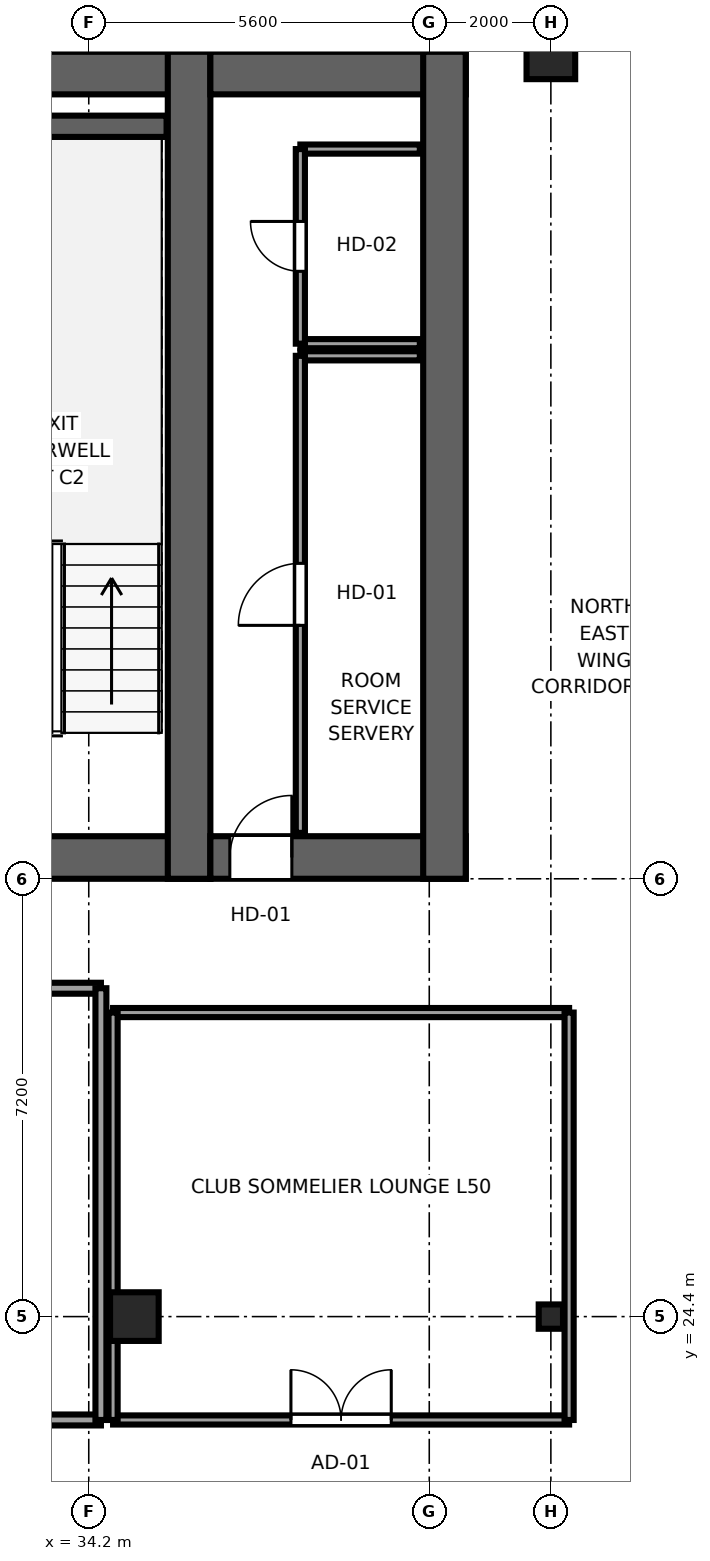
"""IFC4 building model, lengths in metres.
Left out: names, types, materials, properties, quantities, classifications, styles, units other than length and angle.
Written with IfcOpenShell. Run it as: python <this file> out.ifc"""

import sys

from ifc_helpers import new_model, si_unit, direction, frame, frame_2d, origin, origin_2d, place, context, subcontext, project, spatial, rectangle, i_section, extrude, source, transform, mapped, element, fill, save


model = new_model("IFC4")
c1 = context("Model", 3, precision=1e-05, world=origin(), true_north=direction((0.0, 1.0)))
c2 = subcontext(c1, "Body", "Model", "MODEL_VIEW")
j1 = project(units=[si_unit("LENGTHUNIT", "METRE"), si_unit("PLANEANGLEUNIT", "RADIAN")], contexts=[c1])
p1 = place(None, origin())
s1 = spatial("IfcSite", under=j1, at=p1, CompositionType="ELEMENT")
p2 = place(p1, origin())
s2 = spatial("IfcBuilding", under=s1, at=p2, CompositionType="ELEMENT")
p3 = place(p2, frame((0.0, 0.0, 191.1)))
s3 = spatial("IfcBuildingStorey", under=s2, at=p3, CompositionType="ELEMENT", Elevation=191.1)
p4 = place(p3, frame((9.8, 31.95, 0.0), z_axis=(0.0, 0.0, 1.0), x_axis=(1.0, 0.0, 0.0)))
e1 = element("IfcWall", 1, at=p4, inside=s3, PredefinedType="SHEAR", context=c2, shape_type="SweptSolid", body=[
    extrude(rectangle(XDim=26.4, YDim=0.7, at=frame_2d((13.2, 0.0))), origin(), (0.0, 0.0, 1.0), 3.55),
])
p5 = place(p4, frame((6.32, 0.0, 0.0), z_axis=(0.0, 0.0, 1.0), x_axis=(-1.0, 0.0, 0.0)))
e2 = element("IfcOpeningElement", 2, at=p5, cuts=e1, PredefinedType="OPENING", context=c2, shape_type="SweptSolid", body=[
    extrude(rectangle(XDim=1.5, YDim=2.04, at=frame_2d((0.75, 1.02))), frame((0.0, 0.36, 0.0), z_axis=(0.0, -1.0, 0.0), x_axis=(1.0, 0.0, 0.0)), (0.0, 0.0, 1.0), 0.72),
])
p6 = place(p4, frame((13.95, 0.0, 0.0), z_axis=(0.0, 0.0, 1.0), x_axis=(-1.0, 0.0, 0.0)))
e3 = element("IfcOpeningElement", 3, at=p6, cuts=e1, PredefinedType="OPENING", context=c2, shape_type="SweptSolid", body=[
    extrude(rectangle(XDim=1.5, YDim=2.04, at=frame_2d((0.75, 1.02))), frame((0.0, 0.36, 0.0), z_axis=(0.0, -1.0, 0.0), x_axis=(1.0, 0.0, 0.0)), (0.0, 0.0, 1.0), 0.72),
])
p7 = place(p4, frame((21.58, 0.0, 0.0), z_axis=(0.0, 0.0, 1.0), x_axis=(-1.0, 0.0, 0.0)))
e4 = element("IfcOpeningElement", 4, at=p7, cuts=e1, PredefinedType="OPENING", context=c2, shape_type="SweptSolid", body=[
    extrude(rectangle(XDim=1.5, YDim=2.04, at=frame_2d((0.75, 1.02))), frame((0.0, 0.36, 0.0), z_axis=(0.0, -1.0, 0.0), x_axis=(1.0, 0.0, 0.0)), (0.0, 0.0, 1.0), 0.72),
])
p8 = place(p4, frame((8.37, 0.0, 0.0), z_axis=(0.0, 0.0, 1.0), x_axis=(-1.0, 0.0, 0.0)))
e5 = element("IfcOpeningElement", 5, at=p8, cuts=e1, PredefinedType="OPENING", context=c2, shape_type="SweptSolid", body=[
    extrude(rectangle(XDim=0.82, YDim=2.01, at=frame_2d((0.41, 1.005))), frame((0.0, 0.36, 0.0), z_axis=(0.0, -1.0, 0.0), x_axis=(1.0, 0.0, 0.0)), (0.0, 0.0, 1.0), 0.72),
])
p9 = place(p4, frame((18.87, 0.0, 0.0), z_axis=(0.0, 0.0, 1.0), x_axis=(-1.0, 0.0, 0.0)))
e6 = element("IfcOpeningElement", 6, at=p9, cuts=e1, PredefinedType="OPENING", context=c2, shape_type="SweptSolid", body=[
    extrude(rectangle(XDim=0.82, YDim=2.01, at=frame_2d((0.41, 1.005))), frame((0.0, 0.36, 0.0), z_axis=(0.0, -1.0, 0.0), x_axis=(1.0, 0.0, 0.0)), (0.0, 0.0, 1.0), 0.72),
])
p10 = place(p3, frame((9.8, 44.85, 0.0), z_axis=(0.0, 0.0, 1.0), x_axis=(1.0, 0.0, 0.0)))
e7 = element("IfcWall", 7, at=p10, inside=s3, PredefinedType="SHEAR", context=c2, shape_type="SweptSolid", body=[
    extrude(rectangle(XDim=26.4, YDim=0.7, at=frame_2d((13.2, 0.0))), origin(), (0.0, 0.0, 1.0), 3.55),
])
p11 = place(p3, frame((35.85, 31.6, 0.0), z_axis=(0.0, 0.0, 1.0), x_axis=(0.0, 1.0, 0.0)))
e8 = element("IfcWall", 8, at=p11, inside=s3, PredefinedType="SHEAR", context=c2, shape_type="SweptSolid", body=[
    extrude(rectangle(XDim=13.6, YDim=0.7, at=frame_2d((6.8, 0.0))), origin(), (0.0, 0.0, 1.0), 3.55),
])
p12 = place(p3, frame((36.2, 31.95, 0.0), z_axis=(0.0, 0.0, 1.0), x_axis=(1.0, 0.0, 0.0)))
e9 = element("IfcWall", 9, at=p12, inside=s3, PredefinedType="SHEAR", context=c2, shape_type="SweptSolid", body=[
    extrude(rectangle(XDim=4.2, YDim=0.7, at=frame_2d((2.1, 0.0))), origin(), (0.0, 0.0, 1.0), 3.55),
])
p13 = place(p12, frame((1.34, 0.0, 0.0), z_axis=(0.0, 0.0, 1.0), x_axis=(-1.0, 0.0, 0.0)))
e10 = element("IfcOpeningElement", 10, at=p13, cuts=e9, PredefinedType="OPENING", context=c2, shape_type="SweptSolid", body=[
    extrude(rectangle(XDim=1.02, YDim=2.03, at=frame_2d((0.51, 1.015))), frame((0.0, 0.36, 0.0), z_axis=(0.0, -1.0, 0.0), x_axis=(1.0, 0.0, 0.0)), (0.0, 0.0, 1.0), 0.72),
])
p14 = place(p3, frame((36.2, 44.85, 0.0), z_axis=(0.0, 0.0, 1.0), x_axis=(1.0, 0.0, 0.0)))
e11 = element("IfcWall", 11, at=p14, inside=s3, PredefinedType="SHEAR", context=c2, shape_type="SweptSolid", body=[
    extrude(rectangle(XDim=4.2, YDim=0.7, at=frame_2d((2.1, 0.0))), origin(), (0.0, 0.0, 1.0), 3.55),
])
p15 = place(p3, frame((40.05, 31.6, 0.0), z_axis=(0.0, 0.0, 1.0), x_axis=(0.0, 1.0, 0.0)))
e12 = element("IfcWall", 12, at=p15, inside=s3, PredefinedType="SHEAR", context=c2, shape_type="SweptSolid", body=[
    extrude(rectangle(XDim=13.6, YDim=0.7, at=frame_2d((6.8, 0.0))), origin(), (0.0, 0.0, 1.0), 3.55),
])
p16 = place(p3, frame((31.88, 43.975, 0.0), z_axis=(0.0, 0.0, 1.0), x_axis=(1.0, 0.0, 0.0)))
e13 = element("IfcWall", 13, at=p16, inside=s3, PredefinedType="SHEAR", context=c2, shape_type="SweptSolid", body=[
    extrude(rectangle(XDim=3.6, YDim=0.35, at=frame_2d((1.8, 0.0))), origin(), (0.0, 0.0, 1.0), 3.55),
])
m1 = source(origin(), c2, "Body", "SweptSolid", [
    extrude(rectangle(XDim=0.8, YDim=0.8, at=origin_2d()), origin(), (0.0, 0.0, 1.0), 3.55),
])
p17 = place(p3, frame((34.95, 24.4, 0.0), z_axis=(0.0, 0.0, 1.0), x_axis=(1.0, 0.0, 0.0)))
e14 = element("IfcColumn", 14, at=p17, inside=s3, PredefinedType="COLUMN", context=c2, shape_type="MappedRepresentation", body=[
    mapped(m1, transform((0.0, 0.0, 0.0), x_axis=(1.0, 0.0, 0.0), y_axis=(0.0, 1.0, 0.0), z_axis=(0.0, 0.0, 1.0), scale=1.0)),
])
m2 = source(origin(), c2, "Body", "SweptSolid", [
    extrude(i_section(OverallWidth=0.4, OverallDepth=0.4, WebThickness=0.02, FlangeThickness=0.035, at=origin_2d()), origin(), (0.0, 0.0, 1.0), 3.55),
])
p18 = place(p3, frame((41.8, 24.4, 0.0), z_axis=(0.0, 0.0, 1.0), x_axis=(1.0, 0.0, 0.0)))
e15 = element("IfcColumn", 15, at=p18, inside=s3, PredefinedType="COLUMN", context=c2, shape_type="MappedRepresentation", body=[
    mapped(m2, transform((0.0, 0.0, 0.0), x_axis=(1.0, 0.0, 0.0), y_axis=(0.0, 1.0, 0.0), z_axis=(0.0, 0.0, 1.0), scale=1.0)),
])
p19 = place(p3, frame((41.8, 45.15, 0.0), z_axis=(0.0, 0.0, 1.0), x_axis=(1.0, 0.0, 0.0)))
e16 = element("IfcColumn", 16, at=p19, inside=s3, PredefinedType="COLUMN", context=c2, shape_type="MappedRepresentation", body=[
    mapped(m1, transform((0.0, 0.0, 0.0), x_axis=(1.0, 0.0, 0.0), y_axis=(0.0, 1.0, 0.0), z_axis=(0.0, 0.0, 1.0), scale=1.0)),
])
p20 = place(p3, frame((37.68, 40.2, 0.0), z_axis=(0.0, 0.0, 1.0), x_axis=(1.0, 0.0, 0.0)))
e17 = element("IfcWall", 17, at=p20, inside=s3, PredefinedType="PARTITIONING", context=c2, shape_type="SweptSolid", body=[
    extrude(rectangle(XDim=1.965, YDim=0.15, at=frame_2d((0.982, 0.0))), origin(), (0.0, 0.0, 1.0), 3.37),
])
p21 = place(p3, frame((37.68, 32.355, 0.0), z_axis=(0.0, 0.0, 1.0), x_axis=(0.0, 1.0, 0.0)))
e18 = element("IfcWall", 18, at=p21, inside=s3, PredefinedType="PARTITIONING", context=c2, shape_type="SweptSolid", body=[
    extrude(rectangle(XDim=7.845, YDim=0.15, at=frame_2d((3.922, 0.0))), origin(), (0.0, 0.0, 1.0), 3.37),
])
p22 = place(p21, frame((3.413, 0.0, 0.0)))
e19 = element("IfcOpeningElement", 19, at=p22, cuts=e18, PredefinedType="OPENING", context=c2, shape_type="SweptSolid", body=[
    extrude(rectangle(XDim=1.02, YDim=2.03, at=frame_2d((0.51, 1.015))), frame((0.0, 0.085, 0.0), z_axis=(0.0, -1.0, 0.0), x_axis=(1.0, 0.0, 0.0)), (0.0, 0.0, 1.0), 0.17),
])
for number, where, z_axis, x_axis in (
    (20, (37.68, 40.4, 0.0), (0.0, 0.0, 1.0), (1.0, 0.0, 0.0)),
    (21, (37.68, 43.6, 0.0), (0.0, 0.0, 1.0), (1.0, 0.0, 0.0)),
):
    element("IfcWall", number, at=place(p3, frame(where, z_axis=z_axis, x_axis=x_axis)), inside=s3, PredefinedType="PARTITIONING", context=c2, shape_type="SweptSolid", body=[
        extrude(rectangle(XDim=1.965, YDim=0.15, at=frame_2d((0.982, 0.0))), origin(), (0.0, 0.0, 1.0), 3.37),
    ])
p23 = place(p3, frame((37.68, 40.4, 0.0), z_axis=(0.0, 0.0, 1.0), x_axis=(0.0, 1.0, 0.0)))
e22 = element("IfcWall", 22, at=p23, inside=s3, PredefinedType="PARTITIONING", context=c2, shape_type="SweptSolid", body=[
    extrude(rectangle(XDim=3.2, YDim=0.15, at=frame_2d((1.6, 0.0))), origin(), (0.0, 0.0, 1.0), 3.37),
])
p24 = place(p23, frame((1.19, 0.0, 0.0)))
e23 = element("IfcOpeningElement", 23, at=p24, cuts=e22, PredefinedType="OPENING", context=c2, shape_type="SweptSolid", body=[
    extrude(rectangle(XDim=0.82, YDim=2.01, at=frame_2d((0.41, 1.005))), frame((0.0, 0.085, 0.0), z_axis=(0.0, -1.0, 0.0), x_axis=(1.0, 0.0, 0.0)), (0.0, 0.0, 1.0), 0.17),
])
p25 = place(p3, frame((27.1, 22.7, 0.0), z_axis=(0.0, 0.0, 1.0), x_axis=(1.0, 0.0, 0.0)))
e24 = element("IfcWall", 24, at=p25, inside=s3, PredefinedType="PARTITIONING", context=c2, shape_type="SweptSolid", body=[
    extrude(rectangle(XDim=7.3, YDim=0.18, at=frame_2d((3.65, 0.0))), origin(), (0.0, 0.0, 1.0), 3.37),
])
p26 = place(p25, frame((2.825, 0.0, 0.0)))
e25 = element("IfcOpeningElement", 25, at=p26, cuts=e24, PredefinedType="OPENING", context=c2, shape_type="SweptSolid", body=[
    extrude(rectangle(XDim=1.65, YDim=2.15, at=frame_2d((0.825, 1.075))), frame((0.0, 0.1, 0.0), z_axis=(0.0, -1.0, 0.0), x_axis=(1.0, 0.0, 0.0)), (0.0, 0.0, 1.0), 0.2),
])
p27 = place(p3, frame((27.1, 29.8, 0.0), z_axis=(0.0, 0.0, 1.0), x_axis=(1.0, 0.0, 0.0)))
e26 = element("IfcWall", 26, at=p27, inside=s3, PredefinedType="PARTITIONING", context=c2, shape_type="SweptSolid", body=[
    extrude(rectangle(XDim=7.3, YDim=0.18, at=frame_2d((3.65, 0.0))), origin(), (0.0, 0.0, 1.0), 3.37),
])
p28 = place(p3, frame((34.4, 22.7, 0.0), z_axis=(0.0, 0.0, 1.0), x_axis=(0.0, 1.0, 0.0)))
e27 = element("IfcWall", 27, at=p28, inside=s3, PredefinedType="PARTITIONING", context=c2, shape_type="SweptSolid", body=[
    extrude(rectangle(XDim=7.1, YDim=0.18, at=frame_2d((3.55, 0.0))), origin(), (0.0, 0.0, 1.0), 3.37),
])
p29 = place(p3, frame((34.6, 22.7, 0.0), z_axis=(0.0, 0.0, 1.0), x_axis=(1.0, 0.0, 0.0)))
e28 = element("IfcWall", 28, at=p29, inside=s3, PredefinedType="PARTITIONING", context=c2, shape_type="SweptSolid", body=[
    extrude(rectangle(XDim=7.5, YDim=0.15, at=frame_2d((3.75, 0.0))), origin(), (0.0, 0.0, 1.0), 3.37),
])
p30 = place(p29, frame((2.925, 0.0, 0.0)))
e29 = element("IfcOpeningElement", 29, at=p30, cuts=e28, PredefinedType="OPENING", context=c2, shape_type="SweptSolid", body=[
    extrude(rectangle(XDim=1.65, YDim=2.15, at=frame_2d((0.825, 1.075))), frame((0.0, 0.085, 0.0), z_axis=(0.0, -1.0, 0.0), x_axis=(1.0, 0.0, 0.0)), (0.0, 0.0, 1.0), 0.17),
])
p31 = place(p3, frame((34.6, 29.4, 0.0), z_axis=(0.0, 0.0, 1.0), x_axis=(1.0, 0.0, 0.0)))
e30 = element("IfcWall", 30, at=p31, inside=s3, PredefinedType="PARTITIONING", context=c2, shape_type="SweptSolid", body=[
    extrude(rectangle(XDim=7.5, YDim=0.15, at=frame_2d((3.75, 0.0))), origin(), (0.0, 0.0, 1.0), 3.37),
])
p32 = place(p3, frame((34.6, 22.7, 0.0), z_axis=(0.0, 0.0, 1.0), x_axis=(0.0, 1.0, 0.0)))
e31 = element("IfcWall", 31, at=p32, inside=s3, PredefinedType="PARTITIONING", context=c2, shape_type="SweptSolid", body=[
    extrude(rectangle(XDim=6.7, YDim=0.15, at=frame_2d((3.35, 0.0))), origin(), (0.0, 0.0, 1.0), 3.37),
])
p33 = place(p3, frame((42.1, 22.7, 0.0), z_axis=(0.0, 0.0, 1.0), x_axis=(0.0, 1.0, 0.0)))
e32 = element("IfcWall", 32, at=p33, inside=s3, PredefinedType="PARTITIONING", context=c2, shape_type="SweptSolid", body=[
    extrude(rectangle(XDim=6.7, YDim=0.15, at=frame_2d((3.35, 0.0))), origin(), (0.0, 0.0, 1.0), 2.16),
])
m3 = source(origin(), c2, "Body", "SweptSolid", [
    extrude(rectangle(XDim=1.02, YDim=2.03, at=frame_2d((0.51, 1.015))), frame((0.0, 0.025, 0.0), z_axis=(0.0, -1.0, 0.0), x_axis=(1.0, 0.0, 0.0)), (0.0, 0.0, 1.0), 0.05),
])
p34 = place(p13, origin())
e33 = element("IfcDoor", 33, at=p34, inside=s3, OperationType="SINGLE_SWING_RIGHT", PredefinedType="DOOR", context=c2, shape_type="MappedRepresentation", body=[
    mapped(m3, transform((0.0, 0.0, 0.0), x_axis=(1.0, 0.0, 0.0), y_axis=(0.0, 1.0, 0.0), z_axis=(0.0, 0.0, 1.0), scale=1.0)),
])
fill(e10, e33)
p35 = place(p22, origin())
e34 = element("IfcDoor", 34, at=p35, inside=s3, OperationType="SINGLE_SWING_LEFT", PredefinedType="DOOR", context=c2, shape_type="MappedRepresentation", body=[
    mapped(m3, transform((0.0, 0.0, 0.0), x_axis=(1.0, 0.0, 0.0), y_axis=(0.0, 1.0, 0.0), z_axis=(0.0, 0.0, 1.0), scale=1.0)),
])
fill(e19, e34)
m4 = source(origin(), c2, "Body", "SweptSolid", [
    extrude(rectangle(XDim=0.82, YDim=2.01, at=frame_2d((0.41, 1.005))), frame((0.0, 0.025, 0.0), z_axis=(0.0, -1.0, 0.0), x_axis=(1.0, 0.0, 0.0)), (0.0, 0.0, 1.0), 0.05),
])
p36 = place(p24, origin())
e35 = element("IfcDoor", 35, at=p36, inside=s3, OperationType="SINGLE_SWING_RIGHT", PredefinedType="DOOR", context=c2, shape_type="MappedRepresentation", body=[
    mapped(m4, transform((0.0, 0.0, 0.0), x_axis=(1.0, 0.0, 0.0), y_axis=(0.0, 1.0, 0.0), z_axis=(0.0, 0.0, 1.0), scale=1.0)),
])
fill(e23, e35)
m5 = source(origin(), c2, "Body", "SweptSolid", [
    extrude(rectangle(XDim=1.65, YDim=2.15, at=frame_2d((0.825, 1.075))), frame((0.0, 0.025, 0.0), z_axis=(0.0, -1.0, 0.0), x_axis=(1.0, 0.0, 0.0)), (0.0, 0.0, 1.0), 0.05),
])
p37 = place(p30, origin())
e36 = element("IfcDoor", 36, at=p37, inside=s3, OperationType="DOUBLE_DOOR_SINGLE_SWING", PredefinedType="DOOR", context=c2, shape_type="MappedRepresentation", body=[
    mapped(m5, transform((0.0, 0.0, 0.0), x_axis=(1.0, 0.0, 0.0), y_axis=(0.0, 1.0, 0.0), z_axis=(0.0, 0.0, 1.0), scale=1.0)),
])
fill(e29, e36)
save(model, sys.argv[1])
